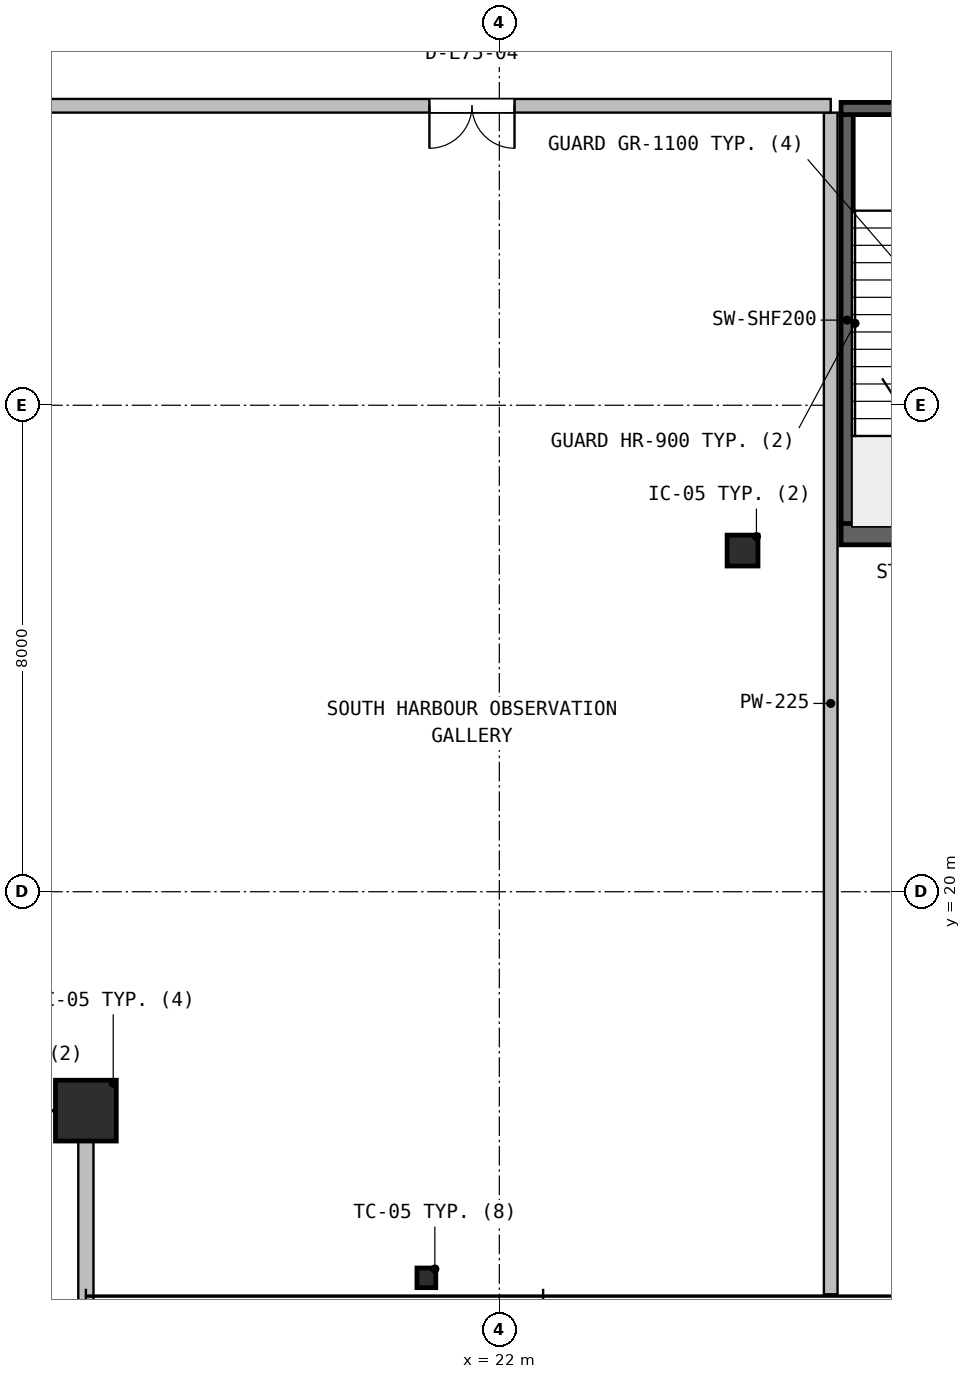
"""IFC4 building model, lengths in metres.
Left out: names, types, materials, properties, quantities, classifications, styles, units other than length and angle.
Written with IfcOpenShell. Run it as: python <this file> out.ifc"""

import sys

from ifc_helpers import new_model, si_unit, direction, frame, frame_2d, origin, origin_2d, place, context, subcontext, project, spatial, rectangle, hollow_rectangle, hollow_circle, i_section, extrude, source, transform, mapped, element, fill, save


model = new_model("IFC4")
c1 = context("Model", 3, precision=1e-05, world=origin(), true_north=direction((0.0, 1.0)))
c2 = subcontext(c1, "Body", "Model", "MODEL_VIEW")
j1 = project(units=[si_unit("LENGTHUNIT", "METRE"), si_unit("PLANEANGLEUNIT", "RADIAN")], contexts=[c1])
p1 = place(None, origin())
s1 = spatial("IfcSite", under=j1, at=p1, CompositionType="ELEMENT")
p2 = place(p1, origin())
s2 = spatial("IfcBuilding", under=s1, at=p2, CompositionType="ELEMENT")
p3 = place(p2, frame((0.0, 0.0, 300.2)))
s3 = spatial("IfcBuildingStorey", under=s2, at=p3, CompositionType="ELEMENT", Elevation=300.2)
m1 = source(origin(), c2, "Body", "SweptSolid", [
    extrude(hollow_rectangle(XDim=1.0, YDim=1.0, WallThickness=0.04, at=origin_2d()), origin(), (0.0, 0.0, 1.0), 4.8),
])
p4 = place(p3, frame((15.2, 16.4, 0.0), z_axis=(0.0, 0.0, 1.0), x_axis=(1.0, 0.0, 0.0)))
e1 = element("IfcColumn", 1, at=p4, inside=s3, PredefinedType="COLUMN", context=c2, shape_type="MappedRepresentation", body=[
    mapped(m1, transform((0.0, 0.0, 0.0), x_axis=(1.0, 0.0, 0.0), y_axis=(0.0, 1.0, 0.0), z_axis=(0.0, 0.0, 1.0), scale=1.0)),
])
m2 = source(origin(), c2, "Body", "SweptSolid", [
    extrude(i_section(OverallWidth=0.309, OverallDepth=0.323, WebThickness=0.014, FlangeThickness=0.023, FilletRadius=0.015, at=origin_2d()), origin(), (0.0, 0.0, 1.0), 4.8),
])
p5 = place(p3, frame((20.8, 13.65, 0.0), z_axis=(0.0, 0.0, 1.0), x_axis=(1.0, 0.0, 0.0)))
e2 = element("IfcColumn", 2, at=p5, inside=s3, PredefinedType="COLUMN", context=c2, shape_type="MappedRepresentation", body=[
    mapped(m2, transform((0.0, 0.0, 0.0), x_axis=(1.0, 0.0, 0.0), y_axis=(0.0, 1.0, 0.0), z_axis=(0.0, 0.0, 1.0), scale=1.0)),
])
m3 = source(origin(), c2, "Body", "SweptSolid", [
    extrude(hollow_circle(Radius=0.254, WallThickness=0.02, at=origin_2d()), origin(), (0.0, 0.0, 1.0), 4.8),
])
p6 = place(p3, frame((26.0, 25.61, 0.0), z_axis=(0.0, 0.0, 1.0), x_axis=(1.0, 0.0, 0.0)))
e3 = element("IfcColumn", 3, at=p6, inside=s3, PredefinedType="COLUMN", context=c2, shape_type="MappedRepresentation", body=[
    mapped(m3, transform((0.0, 0.0, 0.0), x_axis=(1.0, 0.0, 0.0), y_axis=(0.0, 1.0, 0.0), z_axis=(0.0, 0.0, 1.0), scale=1.0)),
])
p7 = place(p3, frame((15.2, 13.28, 0.0), z_axis=(0.0, 0.0, 1.0), x_axis=(0.0, 1.0, 0.0)))
e4 = element("IfcWall", 4, at=p7, inside=s3, PredefinedType="SOLIDWALL", context=c2, shape_type="SweptSolid", body=[
    extrude(rectangle(XDim=3.2, YDim=0.25, at=frame_2d((1.6, 0.0))), origin(), (0.0, 0.0, 1.0), 4.141),
])
p8 = place(p3, frame((27.72, 26.0, -0.28), z_axis=(0.0, 0.0, 1.0), x_axis=(0.0, 1.0, 0.0)))
e5 = element("IfcWall", 5, at=p8, inside=s3, PredefinedType="SHEAR", context=c2, shape_type="SweptSolid", body=[
    extrude(rectangle(XDim=6.8, YDim=0.2, at=frame_2d((3.4, 0.0))), origin(), (0.0, 0.0, 1.0), 4.8),
])
p9 = place(p3, frame((27.62, 25.88, -0.28), z_axis=(0.0, 0.0, 1.0), x_axis=(1.0, 0.0, 0.0)))
e6 = element("IfcWall", 6, at=p9, inside=s3, PredefinedType="SHEAR", context=c2, shape_type="SweptSolid", body=[
    extrude(rectangle(XDim=3.26, YDim=0.35, at=frame_2d((1.63, 0.0))), origin(), (0.0, 0.0, 1.0), 4.8),
])
p10 = place(p3, frame((27.62, 32.88, -0.28), z_axis=(0.0, 0.0, 1.0), x_axis=(1.0, 0.0, 0.0)))
e7 = element("IfcWall", 7, at=p10, inside=s3, PredefinedType="SHEAR", context=c2, shape_type="SweptSolid", body=[
    extrude(rectangle(XDim=3.26, YDim=0.2, at=frame_2d((1.63, 0.0))), origin(), (0.0, 0.0, 1.0), 4.8),
])
p11 = place(p10, frame((1.15, 0.0, 0.28)))
e8 = element("IfcOpeningElement", 8, at=p11, cuts=e7, PredefinedType="OPENING", context=c2, shape_type="SweptSolid", body=[
    extrude(rectangle(XDim=0.95, YDim=2.1, at=frame_2d((0.475, 1.05))), frame((0.0, 0.11, 0.0), z_axis=(0.0, -1.0, 0.0), x_axis=(1.0, 0.0, 0.0)), (0.0, 0.0, 1.0), 0.22),
])
p12 = place(p3, frame((27.45, 13.38, 0.0), z_axis=(0.0, 0.0, 1.0), x_axis=(0.0, 1.0, 0.0)))
e9 = element("IfcWall", 9, at=p12, inside=s3, PredefinedType="PARTITIONING", context=c2, shape_type="SweptSolid", body=[
    extrude(rectangle(XDim=19.432, YDim=0.225, at=frame_2d((9.716, 0.0))), origin(), (0.0, 0.0, 1.0), 3.951),
])
p13 = place(p3, frame((12.18, 32.925, 0.0), z_axis=(0.0, 0.0, 1.0), x_axis=(1.0, 0.0, 0.0)))
e10 = element("IfcWall", 10, at=p13, inside=s3, PredefinedType="PARTITIONING", context=c2, shape_type="SweptSolid", body=[
    extrude(rectangle(XDim=15.27, YDim=0.225, at=frame_2d((7.635, 0.0))), origin(), (0.0, 0.0, 1.0), 3.951),
])
p14 = place(p13, frame((8.67, 0.0, 0.0)))
e11 = element("IfcOpeningElement", 11, at=p14, cuts=e10, PredefinedType="OPENING", context=c2, shape_type="SweptSolid", body=[
    extrude(rectangle(XDim=1.4, YDim=2.12, at=frame_2d((0.7, 1.06))), frame((0.0, 0.123, 0.0), z_axis=(0.0, -1.0, 0.0), x_axis=(1.0, 0.0, 0.0)), (0.0, 0.0, 1.0), 0.245),
])
m4 = source(origin(), c2, "Body", "SweptSolid", [
    extrude(rectangle(XDim=1.4, YDim=2.12, at=frame_2d((0.7, 1.06))), frame((0.0, 0.025, 0.0), z_axis=(0.0, -1.0, 0.0), x_axis=(1.0, 0.0, 0.0)), (0.0, 0.0, 1.0), 0.05),
])
p15 = place(p14, frame((1.4, 0.0, 0.0), z_axis=(0.0, 0.0, 1.0), x_axis=(-1.0, 0.0, 0.0)))
e12 = element("IfcDoor", 12, at=p15, inside=s3, OperationType="DOUBLE_DOOR_SINGLE_SWING", PredefinedType="DOOR", context=c2, shape_type="MappedRepresentation", body=[
    mapped(m4, transform((0.0, 0.0, 0.0), x_axis=(1.0, 0.0, 0.0), y_axis=(0.0, 1.0, 0.0), z_axis=(0.0, 0.0, 1.0), scale=1.0)),
])
fill(e11, e12)
save(model, sys.argv[1])
